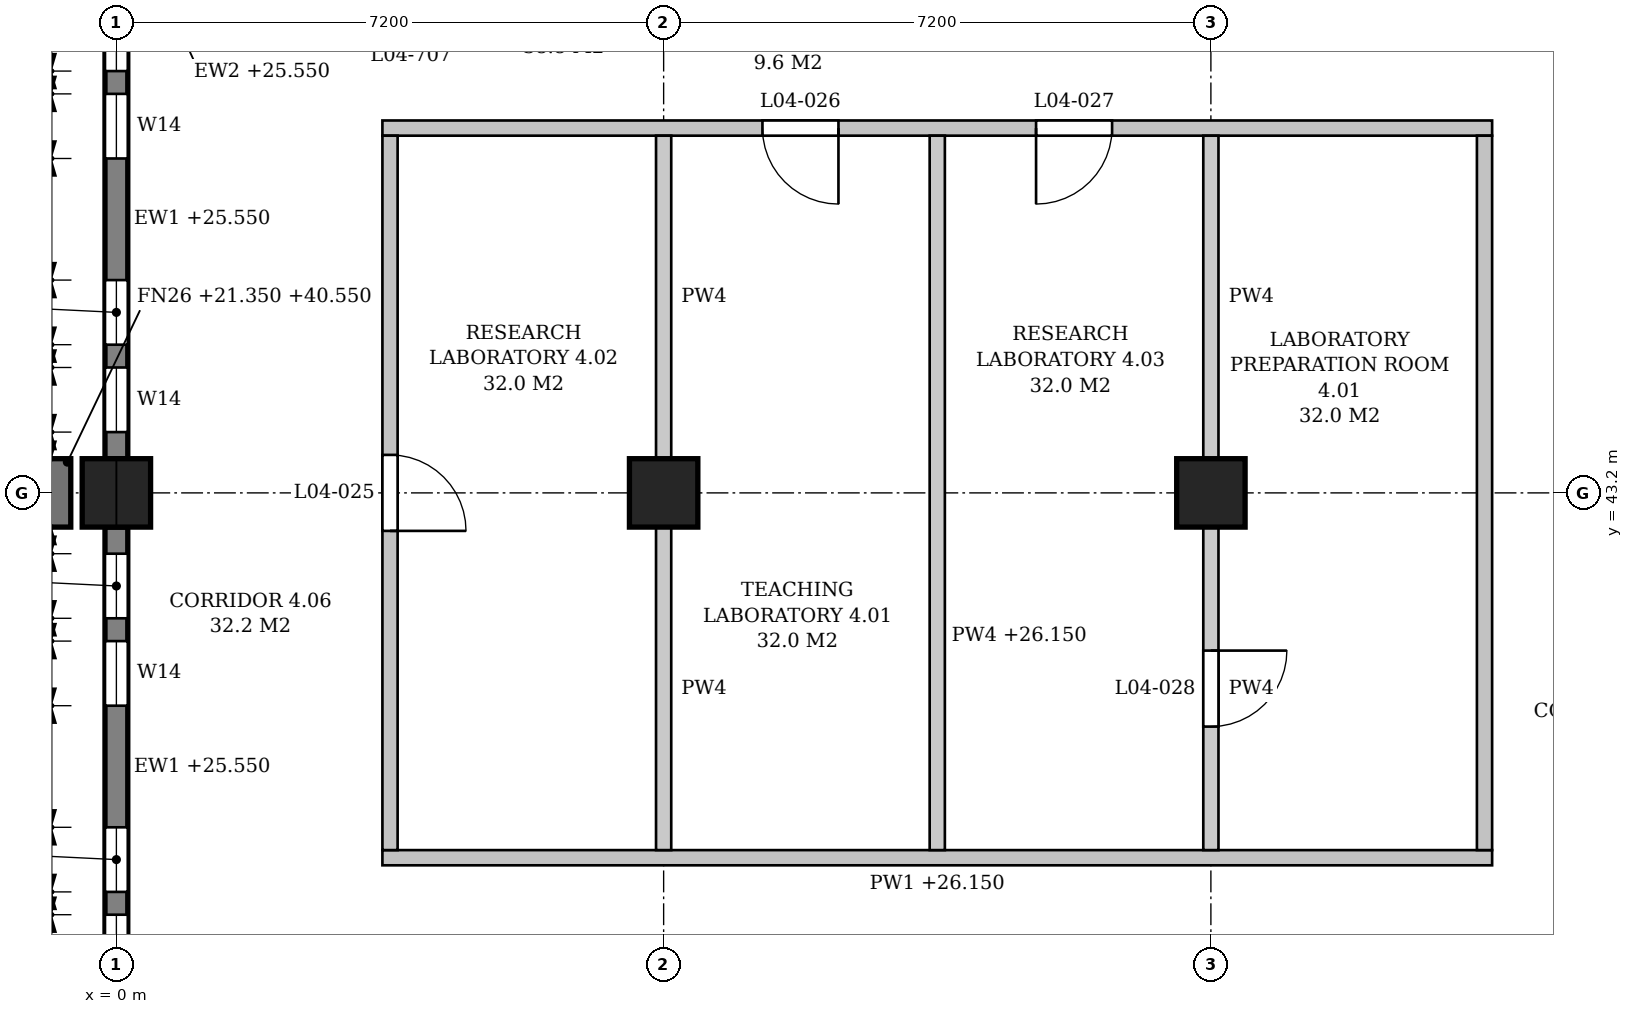
"""IFC4 building model, lengths in metres.
Left out: names, types, materials, properties, quantities, classifications, styles, units other than length and angle.
Written with IfcOpenShell. Run it as: python <this file> out.ifc"""

import sys

from ifc_helpers import new_model, si_unit, direction, frame, frame_2d, origin, origin_2d, place, context, subcontext, project, spatial, polyline, rectangle, outline, extrude, element, fill, save


model = new_model("IFC4")
c1 = context("Model", 3, precision=1e-05, world=origin(), true_north=direction((0.0, 1.0)))
c2 = subcontext(c1, "Body", "Model", "MODEL_VIEW")
j1 = project(units=[si_unit("LENGTHUNIT", "METRE"), si_unit("PLANEANGLEUNIT", "RADIAN")], contexts=[c1])
p1 = place(None, origin())
s1 = spatial("IfcSite", under=j1, at=p1, CompositionType="ELEMENT")
p2 = place(p1, origin())
s2 = spatial("IfcBuilding", under=s1, at=p2, CompositionType="ELEMENT")
p3 = place(p2, frame((0.0, 0.0, 21.6)))
s3 = spatial("IfcBuildingStorey", under=s2, at=p3, CompositionType="ELEMENT", Elevation=21.6)
for number, where, z_axis, x_axis in (
    (1, (0.0, 43.2, 0.0), (0.0, 0.0, 1.0), (1.0, 0.0, 0.0)),
    (2, (7.2, 43.2, 0.0), (0.0, 0.0, 1.0), (1.0, 0.0, 0.0)),
    (3, (14.4, 43.2, 0.0), (0.0, 0.0, 1.0), (1.0, 0.0, 0.0)),
):
    element("IfcColumn", number, at=place(p3, frame(where, z_axis=z_axis, x_axis=x_axis)), inside=s3, PredefinedType="COLUMN", context=c2, shape_type="SweptSolid", body=[
        extrude(rectangle(XDim=0.9, YDim=0.9, at=origin_2d()), origin(), (0.0, 0.0, 1.0), 4.8),
    ])
p4 = place(p3, frame((0.0, 36.45, 0.0), z_axis=(0.0, 0.0, 1.0), x_axis=(0.0, 1.0, 0.0)))
e4 = element("IfcWall", 4, at=p4, inside=s3, PredefinedType="STANDARD", context=c2, shape_type="SweptSolid", body=[
    extrude(rectangle(XDim=6.3, YDim=0.3, at=frame_2d((3.15, 0.0))), origin(), (0.0, 0.0, 1.0), 3.95),
])
p5 = place(p4, frame((0.35, 0.0, 0.9)))
e5 = element("IfcOpeningElement", 5, at=p5, cuts=e4, PredefinedType="OPENING", context=c2, shape_type="SweptSolid", body=[
    extrude(outline(polyline([(0.0, 0.0), (0.85, 0.0), (0.85, 2.05), (0.425, 2.5), (0.0, 2.05), (0.0, 0.0)])), frame((0.0, 0.16, 0.0), z_axis=(0.0, -1.0, 0.0), x_axis=(1.0, 0.0, 0.0)), (0.0, 0.0, 1.0), 0.32),
])
p6 = place(p4, frame((1.5, 0.0, 0.9)))
e6 = element("IfcOpeningElement", 6, at=p6, cuts=e4, PredefinedType="OPENING", context=c2, shape_type="SweptSolid", body=[
    extrude(outline(polyline([(0.0, 0.0), (0.85, 0.0), (0.85, 2.05), (0.425, 2.5), (0.0, 2.05), (0.0, 0.0)])), frame((0.0, 0.16, 0.0), z_axis=(0.0, -1.0, 0.0), x_axis=(1.0, 0.0, 0.0)), (0.0, 0.0, 1.0), 0.32),
])
p7 = place(p4, frame((3.95, 0.0, 0.9)))
e7 = element("IfcOpeningElement", 7, at=p7, cuts=e4, PredefinedType="OPENING", context=c2, shape_type="SweptSolid", body=[
    extrude(outline(polyline([(0.0, 0.0), (0.85, 0.0), (0.85, 2.05), (0.425, 2.5), (0.0, 2.05), (0.0, 0.0)])), frame((0.0, 0.16, 0.0), z_axis=(0.0, -1.0, 0.0), x_axis=(1.0, 0.0, 0.0)), (0.0, 0.0, 1.0), 0.32),
])
p8 = place(p4, frame((5.1, 0.0, 0.9)))
e8 = element("IfcOpeningElement", 8, at=p8, cuts=e4, PredefinedType="OPENING", context=c2, shape_type="SweptSolid", body=[
    extrude(outline(polyline([(0.0, 0.0), (0.85, 0.0), (0.85, 2.05), (0.425, 2.5), (0.0, 2.05), (0.0, 0.0)])), frame((0.0, 0.16, 0.0), z_axis=(0.0, -1.0, 0.0), x_axis=(1.0, 0.0, 0.0)), (0.0, 0.0, 1.0), 0.32),
])
p9 = place(p3, frame((0.0, 43.65, 0.0), z_axis=(0.0, 0.0, 1.0), x_axis=(0.0, 1.0, 0.0)))
e9 = element("IfcWall", 9, at=p9, inside=s3, PredefinedType="STANDARD", context=c2, shape_type="SweptSolid", body=[
    extrude(rectangle(XDim=6.3, YDim=0.3, at=frame_2d((3.15, 0.0))), origin(), (0.0, 0.0, 1.0), 3.95),
])
p10 = place(p9, frame((0.35, 0.0, 0.9)))
e10 = element("IfcOpeningElement", 10, at=p10, cuts=e9, PredefinedType="OPENING", context=c2, shape_type="SweptSolid", body=[
    extrude(outline(polyline([(0.0, 0.0), (0.85, 0.0), (0.85, 2.05), (0.425, 2.5), (0.0, 2.05), (0.0, 0.0)])), frame((0.0, 0.16, 0.0), z_axis=(0.0, -1.0, 0.0), x_axis=(1.0, 0.0, 0.0)), (0.0, 0.0, 1.0), 0.32),
])
p11 = place(p9, frame((1.5, 0.0, 0.9)))
e11 = element("IfcOpeningElement", 11, at=p11, cuts=e9, PredefinedType="OPENING", context=c2, shape_type="SweptSolid", body=[
    extrude(outline(polyline([(0.0, 0.0), (0.85, 0.0), (0.85, 2.05), (0.425, 2.5), (0.0, 2.05), (0.0, 0.0)])), frame((0.0, 0.16, 0.0), z_axis=(0.0, -1.0, 0.0), x_axis=(1.0, 0.0, 0.0)), (0.0, 0.0, 1.0), 0.32),
])
p12 = place(p9, frame((3.95, 0.0, 0.9)))
e12 = element("IfcOpeningElement", 12, at=p12, cuts=e9, PredefinedType="OPENING", context=c2, shape_type="SweptSolid", body=[
    extrude(outline(polyline([(0.0, 0.0), (0.85, 0.0), (0.85, 2.05), (0.425, 2.5), (0.0, 2.05), (0.0, 0.0)])), frame((0.0, 0.16, 0.0), z_axis=(0.0, -1.0, 0.0), x_axis=(1.0, 0.0, 0.0)), (0.0, 0.0, 1.0), 0.32),
])
p13 = place(p9, frame((5.1, 0.0, 0.9)))
e13 = element("IfcOpeningElement", 13, at=p13, cuts=e9, PredefinedType="OPENING", context=c2, shape_type="SweptSolid", body=[
    extrude(outline(polyline([(0.0, 0.0), (0.85, 0.0), (0.85, 2.05), (0.425, 2.5), (0.0, 2.05), (0.0, 0.0)])), frame((0.0, 0.16, 0.0), z_axis=(0.0, -1.0, 0.0), x_axis=(1.0, 0.0, 0.0)), (0.0, 0.0, 1.0), 0.32),
])
p14 = place(p3, frame((-0.6, 43.2, -0.25), z_axis=(0.0, 0.0, 1.0), x_axis=(-1.0, 0.0, 0.0)))
e14 = element("IfcWall", 14, at=p14, inside=s3, PredefinedType="POLYGONAL", context=c2, shape_type="SweptSolid", body=[
    extrude(outline(polyline([(1.3, 0.0), (1.3, 18.9), (1.1, 19.2), (0.0, 19.2), (0.0, 0.0), (1.3, 0.0)])), frame((0.0, 0.45, 0.0), z_axis=(0.0, -1.0, 0.0), x_axis=(1.0, 0.0, 0.0)), (0.0, 0.0, 1.0), 0.9),
])
p15 = place(p3, frame((3.5, 38.4, 0.0), z_axis=(0.0, 0.0, 1.0), x_axis=(1.0, 0.0, 0.0)))
e15 = element("IfcWall", 15, at=p15, inside=s3, PredefinedType="PARTITIONING", context=c2, shape_type="SweptSolid", body=[
    extrude(outline(polyline([(0.0, 0.0), (14.6, 0.0), (14.6, 4.55), (11.15, 4.55), (11.15, 3.8), (10.65, 3.8), (10.65, 4.55), (3.95, 4.55), (3.95, 3.8), (3.45, 3.8), (3.45, 4.55), (0.0, 4.55), (0.0, 0.0)])), frame((0.0, 0.1, 0.0), z_axis=(0.0, -1.0, 0.0), x_axis=(1.0, 0.0, 0.0)), (0.0, 0.0, 1.0), 0.2),
])
p16 = place(p3, frame((3.5, 48.0, 0.0), z_axis=(0.0, 0.0, 1.0), x_axis=(1.0, 0.0, 0.0)))
e16 = element("IfcWall", 16, at=p16, inside=s3, PredefinedType="PARTITIONING", context=c2, shape_type="SweptSolid", body=[
    extrude(outline(polyline([(0.0, 0.0), (14.6, 0.0), (14.6, 4.55), (11.15, 4.55), (11.15, 3.8), (10.65, 3.8), (10.65, 4.55), (3.95, 4.55), (3.95, 3.8), (3.45, 3.8), (3.45, 4.55), (0.0, 4.55), (0.0, 0.0)])), frame((0.0, 0.1, 0.0), z_axis=(0.0, -1.0, 0.0), x_axis=(1.0, 0.0, 0.0)), (0.0, 0.0, 1.0), 0.2),
])
p17 = place(p16, frame((5.0, 0.0, 0.0)))
e17 = element("IfcOpeningElement", 17, at=p17, cuts=e16, PredefinedType="OPENING", context=c2, shape_type="SweptSolid", body=[
    extrude(rectangle(XDim=1.0, YDim=2.1, at=frame_2d((0.5, 1.05))), frame((0.0, 0.11, 0.0), z_axis=(0.0, -1.0, 0.0), x_axis=(1.0, 0.0, 0.0)), (0.0, 0.0, 1.0), 0.22),
])
p18 = place(p16, frame((8.6, 0.0, 0.0)))
e18 = element("IfcOpeningElement", 18, at=p18, cuts=e16, PredefinedType="OPENING", context=c2, shape_type="SweptSolid", body=[
    extrude(rectangle(XDim=1.0, YDim=2.1, at=frame_2d((0.5, 1.05))), frame((0.0, 0.11, 0.0), z_axis=(0.0, -1.0, 0.0), x_axis=(1.0, 0.0, 0.0)), (0.0, 0.0, 1.0), 0.22),
])
p19 = place(p3, frame((3.6, 38.5, 0.0), z_axis=(0.0, 0.0, 1.0), x_axis=(0.0, 1.0, 0.0)))
e19 = element("IfcWall", 19, at=p19, inside=s3, PredefinedType="PARTITIONING", context=c2, shape_type="SweptSolid", body=[
    extrude(outline(polyline([(0.0, 0.0), (9.4, 0.0), (9.4, 4.55), (4.95, 4.55), (4.95, 3.8), (4.45, 3.8), (4.45, 4.55), (0.0, 4.55), (0.0, 0.0)])), frame((0.0, 0.1, 0.0), z_axis=(0.0, -1.0, 0.0), x_axis=(1.0, 0.0, 0.0)), (0.0, 0.0, 1.0), 0.2),
])
p20 = place(p19, frame((4.2, 0.0, 0.0)))
e20 = element("IfcOpeningElement", 20, at=p20, cuts=e19, PredefinedType="OPENING", context=c2, shape_type="SweptSolid", body=[
    extrude(rectangle(XDim=1.0, YDim=2.1, at=frame_2d((0.5, 1.05))), frame((0.0, 0.11, 0.0), z_axis=(0.0, -1.0, 0.0), x_axis=(1.0, 0.0, 0.0)), (0.0, 0.0, 1.0), 0.22),
])
for number, where, z_axis, x_axis in (
    (21, (7.2, 38.5, 0.0), (0.0, 0.0, 1.0), (0.0, 1.0, 0.0)),
    (22, (7.2, 43.65, 0.0), (0.0, 0.0, 1.0), (0.0, 1.0, 0.0)),
):
    element("IfcWall", number, at=place(p3, frame(where, z_axis=z_axis, x_axis=x_axis)), inside=s3, PredefinedType="PARTITIONING", context=c2, shape_type="SweptSolid", body=[
        extrude(rectangle(XDim=4.25, YDim=0.2, at=frame_2d((2.125, 0.0))), origin(), (0.0, 0.0, 1.0), 3.8),
    ])
p21 = place(p3, frame((10.8, 38.5, 0.0), z_axis=(0.0, 0.0, 1.0), x_axis=(0.0, 1.0, 0.0)))
e23 = element("IfcWall", 23, at=p21, inside=s3, PredefinedType="PARTITIONING", context=c2, shape_type="SweptSolid", body=[
    extrude(outline(polyline([(0.0, 0.0), (9.4, 0.0), (9.4, 4.55), (4.95, 4.55), (4.95, 3.8), (4.45, 3.8), (4.45, 4.55), (0.0, 4.55), (0.0, 0.0)])), frame((0.0, 0.1, 0.0), z_axis=(0.0, -1.0, 0.0), x_axis=(1.0, 0.0, 0.0)), (0.0, 0.0, 1.0), 0.2),
])
p22 = place(p3, frame((14.4, 38.5, 0.0), z_axis=(0.0, 0.0, 1.0), x_axis=(0.0, 1.0, 0.0)))
e24 = element("IfcWall", 24, at=p22, inside=s3, PredefinedType="PARTITIONING", context=c2, shape_type="SweptSolid", body=[
    extrude(rectangle(XDim=4.25, YDim=0.2, at=frame_2d((2.125, 0.0))), origin(), (0.0, 0.0, 1.0), 3.8),
])
p23 = place(p22, frame((1.625, 0.0, 0.0)))
e25 = element("IfcOpeningElement", 25, at=p23, cuts=e24, PredefinedType="OPENING", context=c2, shape_type="SweptSolid", body=[
    extrude(rectangle(XDim=1.0, YDim=2.1, at=frame_2d((0.5, 1.05))), frame((0.0, 0.11, 0.0), z_axis=(0.0, -1.0, 0.0), x_axis=(1.0, 0.0, 0.0)), (0.0, 0.0, 1.0), 0.22),
])
p24 = place(p3, frame((14.4, 43.65, 0.0), z_axis=(0.0, 0.0, 1.0), x_axis=(0.0, 1.0, 0.0)))
e26 = element("IfcWall", 26, at=p24, inside=s3, PredefinedType="PARTITIONING", context=c2, shape_type="SweptSolid", body=[
    extrude(rectangle(XDim=4.25, YDim=0.2, at=frame_2d((2.125, 0.0))), origin(), (0.0, 0.0, 1.0), 3.8),
])
p25 = place(p3, frame((18.0, 38.5, 0.0), z_axis=(0.0, 0.0, 1.0), x_axis=(0.0, 1.0, 0.0)))
e27 = element("IfcWall", 27, at=p25, inside=s3, PredefinedType="PARTITIONING", context=c2, shape_type="SweptSolid", body=[
    extrude(outline(polyline([(0.0, 0.0), (9.4, 0.0), (9.4, 4.55), (4.95, 4.55), (4.95, 3.8), (4.45, 3.8), (4.45, 4.55), (0.0, 4.55), (0.0, 0.0)])), frame((0.0, 0.1, 0.0), z_axis=(0.0, -1.0, 0.0), x_axis=(1.0, 0.0, 0.0)), (0.0, 0.0, 1.0), 0.2),
])
p26 = place(p5, origin())
e28 = element("IfcWindow", 28, at=p26, inside=s3, PartitioningType="SINGLE_PANEL", PredefinedType="WINDOW", context=c2, shape_type="SweptSolid", body=[
    extrude(outline(polyline([(0.0, 0.0), (0.85, 0.0), (0.85, 2.05), (0.425, 2.5), (0.0, 2.05), (0.0, 0.0)])), frame((0.0, 0.03, 0.0), z_axis=(0.0, -1.0, 0.0), x_axis=(1.0, 0.0, 0.0)), (0.0, 0.0, 1.0), 0.06),
])
fill(e5, e28)
p27 = place(p6, origin())
e29 = element("IfcWindow", 29, at=p27, inside=s3, PartitioningType="SINGLE_PANEL", PredefinedType="WINDOW", context=c2, shape_type="SweptSolid", body=[
    extrude(outline(polyline([(0.0, 0.0), (0.85, 0.0), (0.85, 2.05), (0.425, 2.5), (0.0, 2.05), (0.0, 0.0)])), frame((0.0, 0.03, 0.0), z_axis=(0.0, -1.0, 0.0), x_axis=(1.0, 0.0, 0.0)), (0.0, 0.0, 1.0), 0.06),
])
fill(e6, e29)
p28 = place(p7, origin())
e30 = element("IfcWindow", 30, at=p28, inside=s3, PartitioningType="SINGLE_PANEL", PredefinedType="WINDOW", context=c2, shape_type="SweptSolid", body=[
    extrude(outline(polyline([(0.0, 0.0), (0.85, 0.0), (0.85, 2.05), (0.425, 2.5), (0.0, 2.05), (0.0, 0.0)])), frame((0.0, 0.03, 0.0), z_axis=(0.0, -1.0, 0.0), x_axis=(1.0, 0.0, 0.0)), (0.0, 0.0, 1.0), 0.06),
])
fill(e7, e30)
p29 = place(p8, origin())
e31 = element("IfcWindow", 31, at=p29, inside=s3, PartitioningType="SINGLE_PANEL", PredefinedType="WINDOW", context=c2, shape_type="SweptSolid", body=[
    extrude(outline(polyline([(0.0, 0.0), (0.85, 0.0), (0.85, 2.05), (0.425, 2.5), (0.0, 2.05), (0.0, 0.0)])), frame((0.0, 0.03, 0.0), z_axis=(0.0, -1.0, 0.0), x_axis=(1.0, 0.0, 0.0)), (0.0, 0.0, 1.0), 0.06),
])
fill(e8, e31)
p30 = place(p10, origin())
e32 = element("IfcWindow", 32, at=p30, inside=s3, PartitioningType="SINGLE_PANEL", PredefinedType="WINDOW", context=c2, shape_type="SweptSolid", body=[
    extrude(outline(polyline([(0.0, 0.0), (0.85, 0.0), (0.85, 2.05), (0.425, 2.5), (0.0, 2.05), (0.0, 0.0)])), frame((0.0, 0.03, 0.0), z_axis=(0.0, -1.0, 0.0), x_axis=(1.0, 0.0, 0.0)), (0.0, 0.0, 1.0), 0.06),
])
fill(e10, e32)
p31 = place(p11, origin())
e33 = element("IfcWindow", 33, at=p31, inside=s3, PartitioningType="SINGLE_PANEL", PredefinedType="WINDOW", context=c2, shape_type="SweptSolid", body=[
    extrude(outline(polyline([(0.0, 0.0), (0.85, 0.0), (0.85, 2.05), (0.425, 2.5), (0.0, 2.05), (0.0, 0.0)])), frame((0.0, 0.03, 0.0), z_axis=(0.0, -1.0, 0.0), x_axis=(1.0, 0.0, 0.0)), (0.0, 0.0, 1.0), 0.06),
])
fill(e11, e33)
p32 = place(p12, origin())
e34 = element("IfcWindow", 34, at=p32, inside=s3, PartitioningType="SINGLE_PANEL", PredefinedType="WINDOW", context=c2, shape_type="SweptSolid", body=[
    extrude(outline(polyline([(0.0, 0.0), (0.85, 0.0), (0.85, 2.05), (0.425, 2.5), (0.0, 2.05), (0.0, 0.0)])), frame((0.0, 0.03, 0.0), z_axis=(0.0, -1.0, 0.0), x_axis=(1.0, 0.0, 0.0)), (0.0, 0.0, 1.0), 0.06),
])
fill(e12, e34)
p33 = place(p13, origin())
e35 = element("IfcWindow", 35, at=p33, inside=s3, PartitioningType="SINGLE_PANEL", PredefinedType="WINDOW", context=c2, shape_type="SweptSolid", body=[
    extrude(outline(polyline([(0.0, 0.0), (0.85, 0.0), (0.85, 2.05), (0.425, 2.5), (0.0, 2.05), (0.0, 0.0)])), frame((0.0, 0.03, 0.0), z_axis=(0.0, -1.0, 0.0), x_axis=(1.0, 0.0, 0.0)), (0.0, 0.0, 1.0), 0.06),
])
fill(e13, e35)
p34 = place(p20, frame((1.0, 0.0, 0.0), z_axis=(0.0, 0.0, 1.0), x_axis=(-1.0, 0.0, 0.0)))
e36 = element("IfcDoor", 36, at=p34, inside=s3, OperationType="SINGLE_SWING_RIGHT", PredefinedType="DOOR", context=c2, shape_type="SweptSolid", body=[
    extrude(rectangle(XDim=1.0, YDim=2.1, at=frame_2d((0.5, 1.05))), frame((0.0, 0.025, 0.0), z_axis=(0.0, -1.0, 0.0), x_axis=(1.0, 0.0, 0.0)), (0.0, 0.0, 1.0), 0.05),
])
fill(e20, e36)
p35 = place(p17, frame((1.0, 0.0, 0.0), z_axis=(0.0, 0.0, 1.0), x_axis=(-1.0, 0.0, 0.0)))
e37 = element("IfcDoor", 37, at=p35, inside=s3, OperationType="SINGLE_SWING_LEFT", PredefinedType="DOOR", context=c2, shape_type="SweptSolid", body=[
    extrude(rectangle(XDim=1.0, YDim=2.1, at=frame_2d((0.5, 1.05))), frame((0.0, 0.025, 0.0), z_axis=(0.0, -1.0, 0.0), x_axis=(1.0, 0.0, 0.0)), (0.0, 0.0, 1.0), 0.05),
])
fill(e17, e37)
p36 = place(p18, frame((1.0, 0.0, 0.0), z_axis=(0.0, 0.0, 1.0), x_axis=(-1.0, 0.0, 0.0)))
e38 = element("IfcDoor", 38, at=p36, inside=s3, OperationType="SINGLE_SWING_RIGHT", PredefinedType="DOOR", context=c2, shape_type="SweptSolid", body=[
    extrude(rectangle(XDim=1.0, YDim=2.1, at=frame_2d((0.5, 1.05))), frame((0.0, 0.025, 0.0), z_axis=(0.0, -1.0, 0.0), x_axis=(1.0, 0.0, 0.0)), (0.0, 0.0, 1.0), 0.05),
])
fill(e18, e38)
p37 = place(p23, frame((1.0, 0.0, 0.0), z_axis=(0.0, 0.0, 1.0), x_axis=(-1.0, 0.0, 0.0)))
e39 = element("IfcDoor", 39, at=p37, inside=s3, OperationType="SINGLE_SWING_LEFT", PredefinedType="DOOR", context=c2, shape_type="SweptSolid", body=[
    extrude(rectangle(XDim=1.0, YDim=2.1, at=frame_2d((0.5, 1.05))), frame((0.0, 0.025, 0.0), z_axis=(0.0, -1.0, 0.0), x_axis=(1.0, 0.0, 0.0)), (0.0, 0.0, 1.0), 0.05),
])
fill(e25, e39)
save(model, sys.argv[1])
